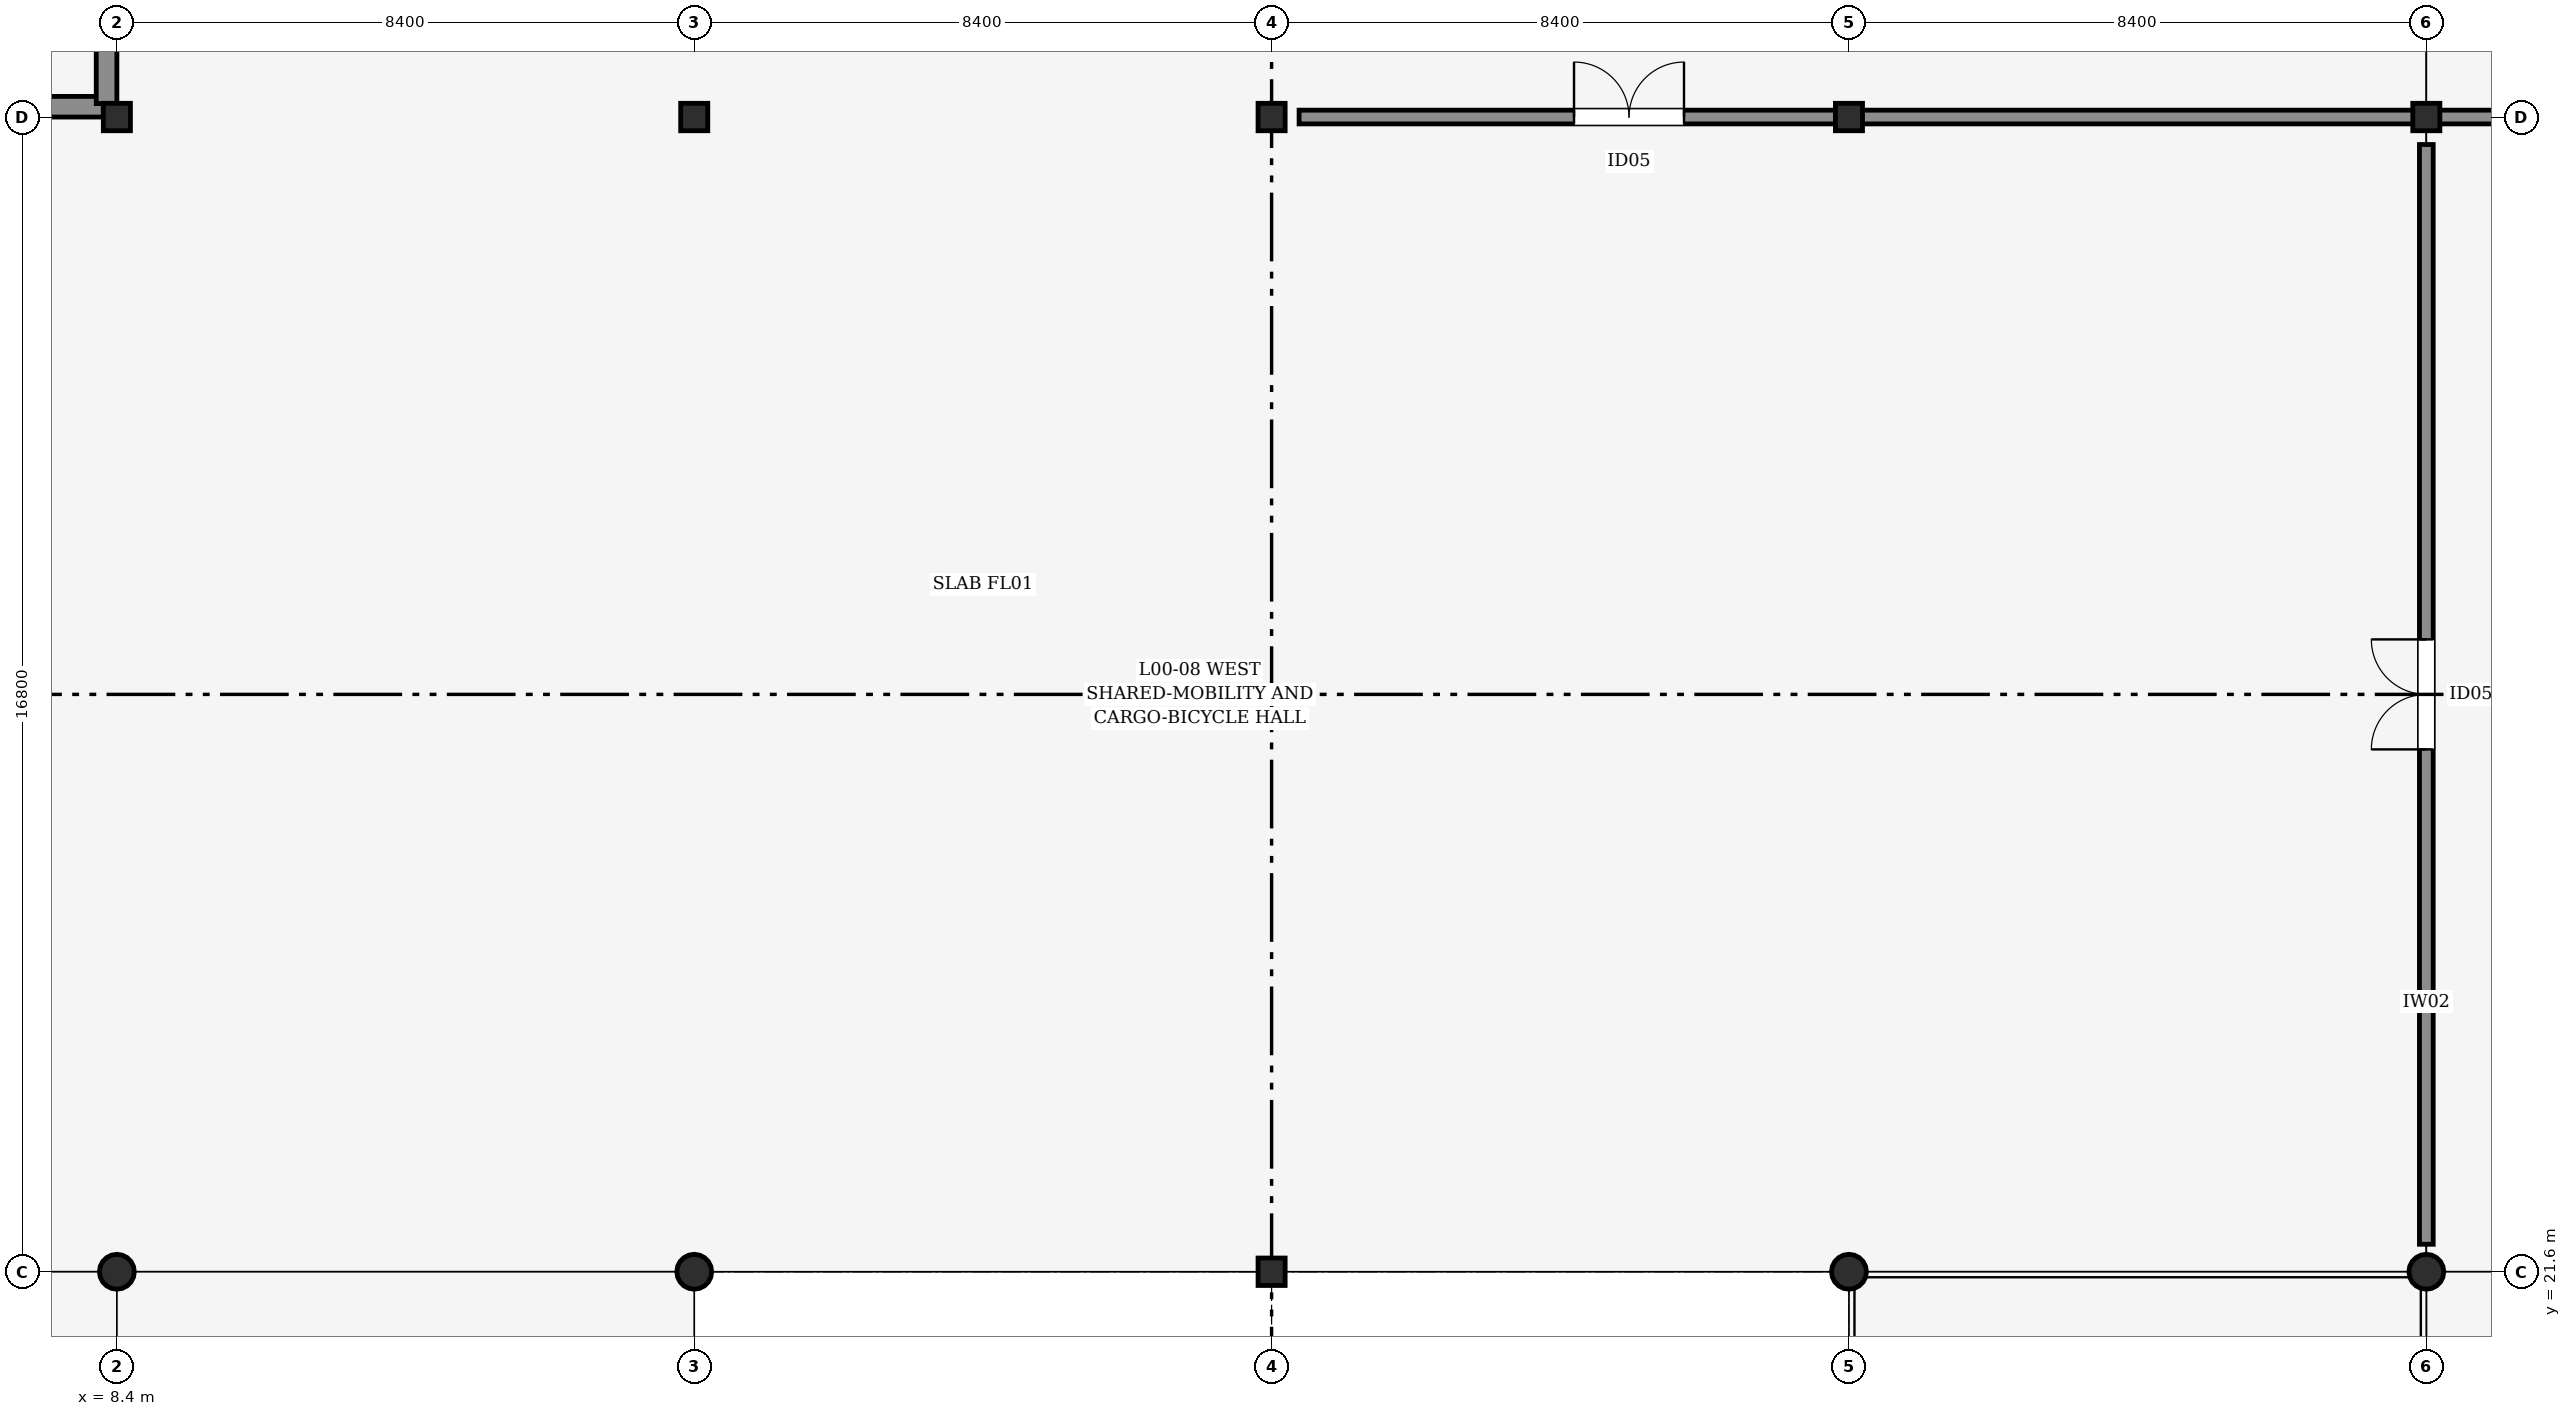
"""IFC4 building model, lengths in metres.
Left out: names, types, materials, properties, quantities, classifications, styles, units other than length and angle.
Written with IfcOpenShell. Run it as: python <this file> out.ifc"""

import sys

from ifc_helpers import new_model, si_unit, direction, frame, frame_2d, origin, origin_2d, place, context, subcontext, project, spatial, rectangle, hollow_circle, i_section, extrude, element, fill, save


model = new_model("IFC4")
c1 = context("Model", 3, precision=1e-05, world=origin(), true_north=direction((0.0, 1.0)))
c2 = subcontext(c1, "Body", "Model", "MODEL_VIEW")
j1 = project(units=[si_unit("LENGTHUNIT", "METRE"), si_unit("PLANEANGLEUNIT", "RADIAN")], contexts=[c1])
p1 = place(None, origin())
s1 = spatial("IfcSite", under=j1, at=p1, CompositionType="ELEMENT")
p2 = place(p1, origin())
s2 = spatial("IfcBuilding", under=s1, at=p2, CompositionType="ELEMENT")
p3 = place(p2, origin())
s3 = spatial("IfcBuildingStorey", under=s2, at=p3, CompositionType="ELEMENT", Elevation=0.0)
p4 = place(p3, frame((8.4, 21.6, 0.0), z_axis=(0.0, 0.0, 1.0), x_axis=(1.0, 0.0, 0.0)))
e1 = element("IfcColumn", 1, at=p4, inside=s3, PredefinedType="COLUMN", context=c2, shape_type="SweptSolid", body=[
    extrude(hollow_circle(Radius=0.254, WallThickness=0.016, at=origin_2d()), origin(), (0.0, 0.0, 1.0), 5.4),
])
p5 = place(p3, frame((8.4, 38.4, 0.0), z_axis=(0.0, 0.0, 1.0), x_axis=(1.0, 0.0, 0.0)))
e2 = element("IfcColumn", 2, at=p5, inside=s3, PredefinedType="COLUMN", context=c2, shape_type="SweptSolid", body=[
    extrude(i_section(OverallWidth=0.399, OverallDepth=0.394, WebThickness=0.023, FlangeThickness=0.037, FilletRadius=0.015, at=origin_2d()), origin(), (0.0, 0.0, 1.0), 5.4),
])
p6 = place(p3, frame((16.8, 21.6, 0.0), z_axis=(0.0, 0.0, 1.0), x_axis=(1.0, 0.0, 0.0)))
e3 = element("IfcColumn", 3, at=p6, inside=s3, PredefinedType="COLUMN", context=c2, shape_type="SweptSolid", body=[
    extrude(hollow_circle(Radius=0.254, WallThickness=0.016, at=origin_2d()), origin(), (0.0, 0.0, 1.0), 5.4),
])
for number, where, z_axis, x_axis in (
    (4, (16.8, 38.4, 0.0), (0.0, 0.0, 1.0), (1.0, 0.0, 0.0)),
    (5, (25.2, 21.6, 0.0), (0.0, 0.0, 1.0), (1.0, 0.0, 0.0)),
    (6, (25.2, 38.4, 0.0), (0.0, 0.0, 1.0), (1.0, 0.0, 0.0)),
):
    element("IfcColumn", number, at=place(p3, frame(where, z_axis=z_axis, x_axis=x_axis)), inside=s3, PredefinedType="COLUMN", context=c2, shape_type="SweptSolid", body=[
        extrude(i_section(OverallWidth=0.399, OverallDepth=0.394, WebThickness=0.023, FlangeThickness=0.037, FilletRadius=0.015, at=origin_2d()), origin(), (0.0, 0.0, 1.0), 5.4),
    ])
p7 = place(p3, frame((33.6, 21.6, 0.0), z_axis=(0.0, 0.0, 1.0), x_axis=(1.0, 0.0, 0.0)))
e7 = element("IfcColumn", 7, at=p7, inside=s3, PredefinedType="COLUMN", context=c2, shape_type="SweptSolid", body=[
    extrude(hollow_circle(Radius=0.254, WallThickness=0.016, at=origin_2d()), origin(), (0.0, 0.0, 1.0), 5.4),
])
p8 = place(p3, frame((33.6, 38.4, 0.0), z_axis=(0.0, 0.0, 1.0), x_axis=(1.0, 0.0, 0.0)))
e8 = element("IfcColumn", 8, at=p8, inside=s3, PredefinedType="COLUMN", context=c2, shape_type="SweptSolid", body=[
    extrude(i_section(OverallWidth=0.399, OverallDepth=0.394, WebThickness=0.023, FlangeThickness=0.037, FilletRadius=0.015, at=origin_2d()), origin(), (0.0, 0.0, 1.0), 5.4),
])
p9 = place(p3, frame((42.0, 21.6, 0.0), z_axis=(0.0, 0.0, 1.0), x_axis=(1.0, 0.0, 0.0)))
e9 = element("IfcColumn", 9, at=p9, inside=s3, PredefinedType="COLUMN", context=c2, shape_type="SweptSolid", body=[
    extrude(hollow_circle(Radius=0.254, WallThickness=0.016, at=origin_2d()), origin(), (0.0, 0.0, 1.0), 5.4),
])
p10 = place(p3, frame((42.0, 38.4, 0.0), z_axis=(0.0, 0.0, 1.0), x_axis=(1.0, 0.0, 0.0)))
e10 = element("IfcColumn", 10, at=p10, inside=s3, PredefinedType="COLUMN", context=c2, shape_type="SweptSolid", body=[
    extrude(i_section(OverallWidth=0.399, OverallDepth=0.394, WebThickness=0.023, FlangeThickness=0.037, FilletRadius=0.015, at=origin_2d()), origin(), (0.0, 0.0, 1.0), 5.4),
])
p11 = place(p3, frame((0.198, 38.55, 0.0), z_axis=(0.0, 0.0, 1.0), x_axis=(1.0, 0.0, 0.0)))
e11 = element("IfcWall", 11, at=p11, inside=s3, PredefinedType="SHEAR", context=c2, shape_type="SweptSolid", body=[
    extrude(rectangle(XDim=8.005, YDim=0.3, at=frame_2d((4.002, 0.0))), origin(), (0.0, 0.0, 1.0), 5.18),
])
p12 = place(p3, frame((8.25, 38.595, 0.0), z_axis=(0.0, 0.0, 1.0), x_axis=(0.0, 1.0, 0.0)))
e12 = element("IfcWall", 12, at=p12, inside=s3, PredefinedType="SHEAR", context=c2, shape_type="SweptSolid", body=[
    extrude(rectangle(XDim=16.41, YDim=0.3, at=frame_2d((8.205, 0.0))), origin(), (0.0, 0.0, 1.0), 5.18),
])
p13 = place(p12, frame((5.655, 0.0, 0.0)))
e13 = element("IfcOpeningElement", 13, at=p13, cuts=e12, PredefinedType="OPENING", context=c2, shape_type="SweptSolid", body=[
    extrude(rectangle(XDim=1.3, YDim=2.2, at=frame_2d((0.65, 1.1))), frame((0.0, 0.16, 0.0), z_axis=(0.0, -1.0, 0.0), x_axis=(1.0, 0.0, 0.0)), (0.0, 0.0, 1.0), 0.32),
])
p14 = place(p3, frame((42.0, 22.0, 0.0), z_axis=(0.0, 0.0, 1.0), x_axis=(0.0, 1.0, 0.0)))
e14 = element("IfcWall", 14, at=p14, inside=s3, PredefinedType="PARTITIONING", context=c2, shape_type="SweptSolid", body=[
    extrude(rectangle(XDim=16.0, YDim=0.2, at=frame_2d((8.0, 0.0))), origin(), (0.0, 0.0, 1.0), 4.325),
])
p15 = place(p14, frame((7.2, 0.0, 0.0)))
e15 = element("IfcOpeningElement", 15, at=p15, cuts=e14, PredefinedType="OPENING", context=c2, shape_type="SweptSolid", body=[
    extrude(rectangle(XDim=1.6, YDim=2.25, at=frame_2d((0.8, 1.125))), frame((0.0, 0.11, 0.0), z_axis=(0.0, -1.0, 0.0), x_axis=(1.0, 0.0, 0.0)), (0.0, 0.0, 1.0), 0.22),
])
p16 = place(p3, frame((25.6, 38.4, 0.0), z_axis=(0.0, 0.0, 1.0), x_axis=(1.0, 0.0, 0.0)))
e16 = element("IfcWall", 16, at=p16, inside=s3, PredefinedType="PARTITIONING", context=c2, shape_type="SweptSolid", body=[
    extrude(rectangle(XDim=32.8, YDim=0.2, at=frame_2d((16.4, 0.0))), origin(), (0.0, 0.0, 1.0), 4.325),
])
p17 = place(p16, frame((4.0, 0.0, 0.0)))
e17 = element("IfcOpeningElement", 17, at=p17, cuts=e16, PredefinedType="OPENING", context=c2, shape_type="SweptSolid", body=[
    extrude(rectangle(XDim=1.6, YDim=2.25, at=frame_2d((0.8, 1.125))), frame((0.0, 0.11, 0.0), z_axis=(0.0, -1.0, 0.0), x_axis=(1.0, 0.0, 0.0)), (0.0, 0.0, 1.0), 0.22),
])
p18 = place(p15, origin())
e18 = element("IfcDoor", 18, at=p18, inside=s3, OperationType="DOUBLE_DOOR_SINGLE_SWING", PredefinedType="DOOR", context=c2, shape_type="SweptSolid", body=[
    extrude(rectangle(XDim=1.6, YDim=2.25, at=frame_2d((0.8, 1.125))), frame((0.0, 0.025, 0.0), z_axis=(0.0, -1.0, 0.0), x_axis=(1.0, 0.0, 0.0)), (0.0, 0.0, 1.0), 0.05),
])
fill(e15, e18)
p19 = place(p17, origin())
e19 = element("IfcDoor", 19, at=p19, inside=s3, OperationType="DOUBLE_DOOR_SINGLE_SWING", PredefinedType="DOOR", context=c2, shape_type="SweptSolid", body=[
    extrude(rectangle(XDim=1.6, YDim=2.25, at=frame_2d((0.8, 1.125))), frame((0.0, 0.025, 0.0), z_axis=(0.0, -1.0, 0.0), x_axis=(1.0, 0.0, 0.0)), (0.0, 0.0, 1.0), 0.05),
])
fill(e17, e19)
save(model, sys.argv[1])
